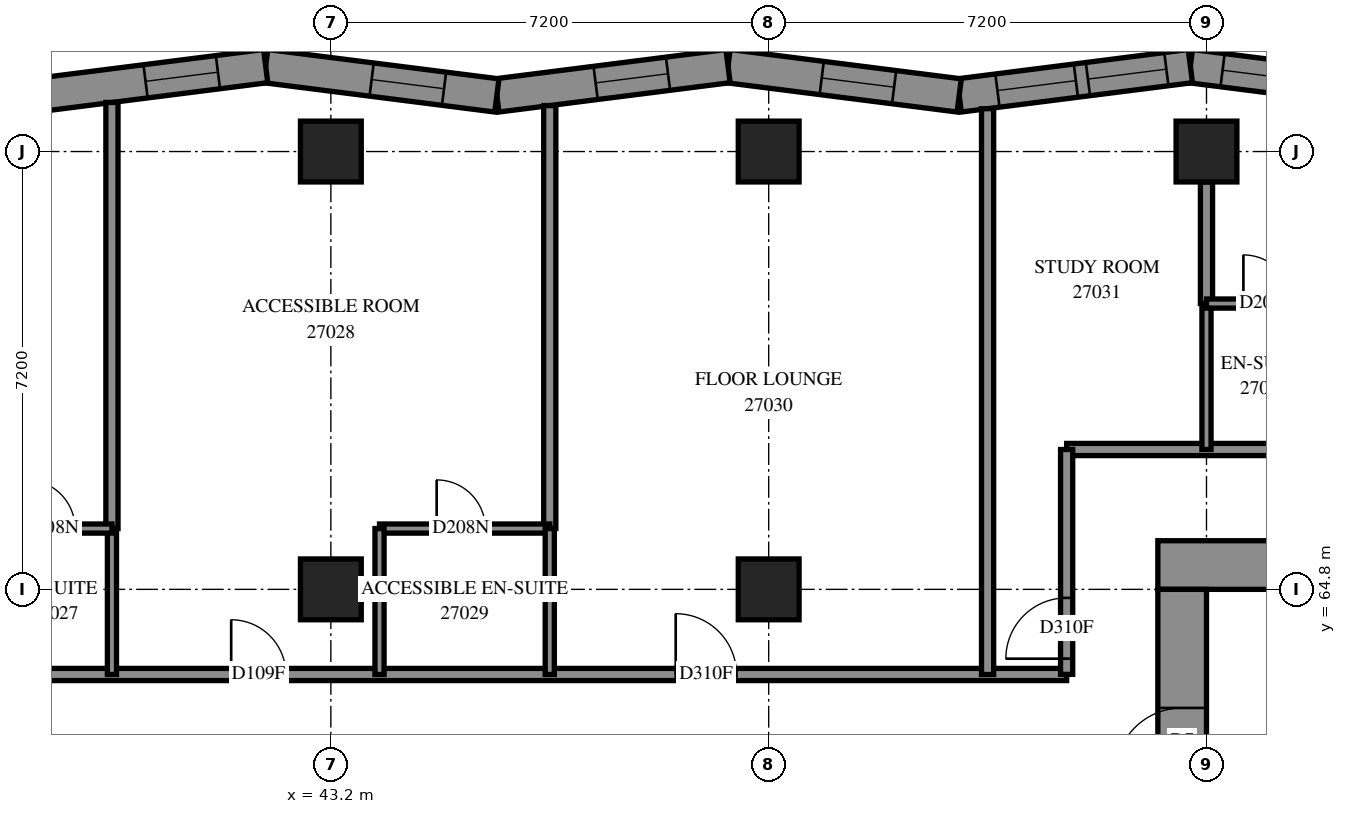
"""IFC4 building model, lengths in metres.
Left out: names, types, materials, properties, quantities, classifications, styles, units other than length and angle.
Written with IfcOpenShell. Run it as: python <this file> out.ifc"""

import sys

from ifc_helpers import new_model, si_unit, direction, frame, frame_2d, origin, origin_2d, place, context, subcontext, project, spatial, polyline, rectangle, outline, extrude, element, fill, save


model = new_model("IFC4")
c1 = context("Model", 3, precision=1e-05, world=origin(), true_north=direction((0.0, 1.0)))
c2 = subcontext(c1, "Body", "Model", "MODEL_VIEW")
j1 = project(units=[si_unit("LENGTHUNIT", "METRE"), si_unit("PLANEANGLEUNIT", "RADIAN")], contexts=[c1])
p1 = place(None, origin())
s1 = spatial("IfcSite", under=j1, at=p1, CompositionType="ELEMENT")
p2 = place(p1, origin())
s2 = spatial("IfcBuilding", under=s1, at=p2, CompositionType="ELEMENT")
p3 = place(p2, frame((0.0, 0.0, 101.6)))
s3 = spatial("IfcBuildingStorey", under=s2, at=p3, CompositionType="ELEMENT", Elevation=101.6)
for number, where, z_axis, x_axis in (
    (1, (43.2, 64.8, 0.0), (0.0, 0.0, 1.0), (1.0, 0.0, 0.0)),
    (2, (43.2, 72.0, 0.0), (0.0, 0.0, 1.0), (1.0, 0.0, 0.0)),
    (3, (50.4, 64.8, 0.0), (0.0, 0.0, 1.0), (1.0, 0.0, 0.0)),
    (4, (50.4, 72.0, 0.0), (0.0, 0.0, 1.0), (1.0, 0.0, 0.0)),
    (5, (57.6, 72.0, 0.0), (0.0, 0.0, 1.0), (1.0, 0.0, 0.0)),
):
    element("IfcColumn", number, at=place(p3, frame(where, z_axis=z_axis, x_axis=x_axis)), inside=s3, PredefinedType="COLUMN", context=c2, shape_type="SweptSolid", body=[
        extrude(rectangle(XDim=1.0, YDim=1.0, at=origin_2d()), origin(), (0.0, 0.0, 1.0), 3.1),
    ])
p4 = place(p3, frame((56.8, 65.2, -0.3), z_axis=(0.0, 0.0, 1.0), x_axis=(1.0, 0.0, 0.0)))
e6 = element("IfcWall", 6, at=p4, inside=s3, PredefinedType="SHEAR", context=c2, shape_type="SweptSolid", body=[
    extrude(rectangle(XDim=16.0, YDim=0.8, at=frame_2d((8.0, 0.0))), origin(), (0.0, 0.0, 1.0), 2.7),
])
p5 = place(p4, frame((10.8, 0.0, 0.3)))
e7 = element("IfcOpeningElement", 7, at=p5, cuts=e6, PredefinedType="OPENING", context=c2, shape_type="SweptSolid", body=[
    extrude(rectangle(XDim=0.8, YDim=2.1, at=frame_2d((0.4, 1.05))), frame((0.0, 0.41, 0.0), z_axis=(0.0, -1.0, 0.0), x_axis=(1.0, 0.0, 0.0)), (0.0, 0.0, 1.0), 0.82),
])
p6 = place(p3, frame((57.2, 50.4, -0.3), z_axis=(0.0, 0.0, 1.0), x_axis=(0.0, 1.0, 0.0)))
e8 = element("IfcWall", 8, at=p6, inside=s3, PredefinedType="SHEAR", context=c2, shape_type="SweptSolid", body=[
    extrude(rectangle(XDim=14.4, YDim=0.8, at=frame_2d((7.2, 0.0))), origin(), (0.0, 0.0, 1.0), 2.7),
])
p7 = place(p6, frame((4.55, 0.0, 0.3)))
e9 = element("IfcOpeningElement", 9, at=p7, cuts=e8, PredefinedType="OPENING", context=c2, shape_type="SweptSolid", body=[
    extrude(rectangle(XDim=1.1, YDim=2.1, at=frame_2d((0.55, 1.05))), frame((0.0, 0.41, 0.0), z_axis=(0.0, -1.0, 0.0), x_axis=(1.0, 0.0, 0.0)), (0.0, 0.0, 1.0), 0.82),
])
p8 = place(p6, frame((11.35, 0.0, 0.3)))
e10 = element("IfcOpeningElement", 10, at=p8, cuts=e8, PredefinedType="OPENING", context=c2, shape_type="SweptSolid", body=[
    extrude(rectangle(XDim=1.1, YDim=2.1, at=frame_2d((0.55, 1.05))), frame((0.0, 0.41, 0.0), z_axis=(0.0, -1.0, 0.0), x_axis=(1.0, 0.0, 0.0)), (0.0, 0.0, 1.0), 0.82),
])
p9 = place(p3, frame((61.137, 72.923, 0.0), z_axis=(0.0, 0.0, 1.0), x_axis=(-0.9920583495, 0.1257785003, 0.0)))
e11 = element("IfcWall", 11, at=p9, inside=s3, PredefinedType="SOLIDWALL", context=c2, shape_type="SweptSolid", body=[
    extrude(outline(polyline([(0.035, -0.275), (3.867, -0.275), (3.797, 0.275), (-0.035, 0.275), (0.035, -0.275)])), origin(), (0.0, 0.0, 1.0), 3.1),
])
p10 = place(p9, frame((0.499, 0.0, 0.5)))
e12 = element("IfcOpeningElement", 12, at=p10, cuts=e11, PredefinedType="OPENING", context=c2, shape_type="SweptSolid", body=[
    extrude(rectangle(XDim=1.3, YDim=2.45, at=frame_2d((0.65, 1.225))), frame((0.0, 0.285, 0.0), z_axis=(0.0, -1.0, 0.0), x_axis=(1.0, 0.0, 0.0)), (0.0, 0.0, 1.0), 0.57),
])
p11 = place(p9, frame((1.999, 0.0, 0.5)))
e13 = element("IfcOpeningElement", 13, at=p11, cuts=e11, PredefinedType="OPENING", context=c2, shape_type="SweptSolid", body=[
    extrude(rectangle(XDim=1.3, YDim=2.45, at=frame_2d((0.65, 1.225))), frame((0.0, 0.285, 0.0), z_axis=(0.0, -1.0, 0.0), x_axis=(1.0, 0.0, 0.0)), (0.0, 0.0, 1.0), 0.57),
])
p12 = place(p3, frame((57.335, 73.405, 0.0), z_axis=(0.0, 0.0, 1.0), x_axis=(-0.9920587623, -0.1257752442, 0.0)))
e14 = element("IfcWall", 14, at=p12, inside=s3, PredefinedType="SOLIDWALL", context=c2, shape_type="SweptSolid", body=[
    extrude(outline(polyline([(-0.035, -0.275), (3.797, -0.275), (3.867, 0.275), (0.035, 0.275), (-0.035, -0.275)])), origin(), (0.0, 0.0, 1.0), 3.1),
])
p13 = place(p12, frame((0.398, 0.0, 0.5)))
e15 = element("IfcOpeningElement", 15, at=p13, cuts=e14, PredefinedType="OPENING", context=c2, shape_type="SweptSolid", body=[
    extrude(rectangle(XDim=1.3, YDim=2.45, at=frame_2d((0.65, 1.225))), frame((0.0, 0.285, 0.0), z_axis=(0.0, -1.0, 0.0), x_axis=(1.0, 0.0, 0.0)), (0.0, 0.0, 1.0), 0.57),
])
p14 = place(p12, frame((1.898, 0.0, 0.5)))
e16 = element("IfcOpeningElement", 16, at=p14, cuts=e14, PredefinedType="OPENING", context=c2, shape_type="SweptSolid", body=[
    extrude(rectangle(XDim=1.3, YDim=2.45, at=frame_2d((0.65, 1.225))), frame((0.0, 0.285, 0.0), z_axis=(0.0, -1.0, 0.0), x_axis=(1.0, 0.0, 0.0)), (0.0, 0.0, 1.0), 0.57),
])
p15 = place(p3, frame((53.533, 72.923, 0.0), z_axis=(0.0, 0.0, 1.0), x_axis=(-0.9920583495, 0.1257785003, 0.0)))
e17 = element("IfcWall", 17, at=p15, inside=s3, PredefinedType="SOLIDWALL", context=c2, shape_type="SweptSolid", body=[
    extrude(outline(polyline([(0.035, -0.275), (3.867, -0.275), (3.797, 0.275), (-0.035, 0.275), (0.035, -0.275)])), origin(), (0.0, 0.0, 1.0), 3.1),
])
p16 = place(p15, frame((1.079, 0.0, 0.5)))
e18 = element("IfcOpeningElement", 18, at=p16, cuts=e17, PredefinedType="OPENING", context=c2, shape_type="SweptSolid", body=[
    extrude(rectangle(XDim=1.2, YDim=2.45, at=frame_2d((0.6, 1.225))), frame((0.0, 0.285, 0.0), z_axis=(0.0, -1.0, 0.0), x_axis=(1.0, 0.0, 0.0)), (0.0, 0.0, 1.0), 0.57),
])
p17 = place(p3, frame((49.732, 73.405, 0.0), z_axis=(0.0, 0.0, 1.0), x_axis=(-0.9920583495, -0.1257785003, 0.0)))
e19 = element("IfcWall", 19, at=p17, inside=s3, PredefinedType="SOLIDWALL", context=c2, shape_type="SweptSolid", body=[
    extrude(outline(polyline([(-0.035, -0.275), (3.797, -0.275), (3.867, 0.275), (0.035, 0.275), (-0.035, -0.275)])), origin(), (0.0, 0.0, 1.0), 3.1),
])
p18 = place(p17, frame((0.995, 0.0, 0.5)))
e20 = element("IfcOpeningElement", 20, at=p18, cuts=e19, PredefinedType="OPENING", context=c2, shape_type="SweptSolid", body=[
    extrude(rectangle(XDim=1.2, YDim=2.45, at=frame_2d((0.6, 1.225))), frame((0.0, 0.285, 0.0), z_axis=(0.0, -1.0, 0.0), x_axis=(1.0, 0.0, 0.0)), (0.0, 0.0, 1.0), 0.57),
])
p19 = place(p3, frame((45.93, 72.923, 0.0), z_axis=(0.0, 0.0, 1.0), x_axis=(-0.9920583495, 0.1257785003, 0.0)))
e21 = element("IfcWall", 21, at=p19, inside=s3, PredefinedType="SOLIDWALL", context=c2, shape_type="SweptSolid", body=[
    extrude(outline(polyline([(0.035, -0.275), (3.867, -0.275), (3.797, 0.275), (-0.035, 0.275), (0.035, -0.275)])), origin(), (0.0, 0.0, 1.0), 3.1),
])
p20 = place(p19, frame((0.876, 0.0, 0.5)))
e22 = element("IfcOpeningElement", 22, at=p20, cuts=e21, PredefinedType="OPENING", context=c2, shape_type="SweptSolid", body=[
    extrude(rectangle(XDim=1.2, YDim=2.45, at=frame_2d((0.6, 1.225))), frame((0.0, 0.285, 0.0), z_axis=(0.0, -1.0, 0.0), x_axis=(1.0, 0.0, 0.0)), (0.0, 0.0, 1.0), 0.57),
])
p21 = place(p3, frame((42.128, 73.405, 0.0), z_axis=(0.0, 0.0, 1.0), x_axis=(-0.9920583495, -0.1257785003, 0.0)))
e23 = element("IfcWall", 23, at=p21, inside=s3, PredefinedType="SOLIDWALL", context=c2, shape_type="SweptSolid", body=[
    extrude(outline(polyline([(-0.035, -0.275), (3.797, -0.275), (3.867, 0.275), (0.035, 0.275), (-0.035, -0.275)])), origin(), (0.0, 0.0, 1.0), 3.1),
])
p22 = place(p21, frame((0.792, 0.0, 0.5)))
e24 = element("IfcOpeningElement", 24, at=p22, cuts=e23, PredefinedType="OPENING", context=c2, shape_type="SweptSolid", body=[
    extrude(rectangle(XDim=1.2, YDim=2.45, at=frame_2d((0.6, 1.225))), frame((0.0, 0.285, 0.0), z_axis=(0.0, -1.0, 0.0), x_axis=(1.0, 0.0, 0.0)), (0.0, 0.0, 1.0), 0.57),
])
p23 = place(p3, frame((33.4, 63.4, 0.0), z_axis=(0.0, 0.0, 1.0), x_axis=(1.0, 0.0, 0.0)))
e25 = element("IfcWall", 25, at=p23, inside=s3, PredefinedType="PARTITIONING", context=c2, shape_type="SweptSolid", body=[
    extrude(rectangle(XDim=21.9, YDim=0.2, at=frame_2d((10.95, 0.0))), origin(), (0.0, 0.0, 1.0), 3.1),
])
p24 = place(p23, frame((3.152, 0.0, 0.0)))
e26 = element("IfcOpeningElement", 26, at=p24, cuts=e25, PredefinedType="OPENING", context=c2, shape_type="SweptSolid", body=[
    extrude(rectangle(XDim=0.9, YDim=2.1, at=frame_2d((0.45, 1.05))), frame((0.0, 0.11, 0.0), z_axis=(0.0, -1.0, 0.0), x_axis=(1.0, 0.0, 0.0)), (0.0, 0.0, 1.0), 0.22),
])
p25 = place(p23, frame((8.161, 0.0, 0.0)))
e27 = element("IfcOpeningElement", 27, at=p25, cuts=e25, PredefinedType="OPENING", context=c2, shape_type="SweptSolid", body=[
    extrude(rectangle(XDim=0.9, YDim=2.1, at=frame_2d((0.45, 1.05))), frame((0.0, 0.11, 0.0), z_axis=(0.0, -1.0, 0.0), x_axis=(1.0, 0.0, 0.0)), (0.0, 0.0, 1.0), 0.22),
])
p26 = place(p23, frame((15.471, 0.0, 0.0)))
e28 = element("IfcOpeningElement", 28, at=p26, cuts=e25, PredefinedType="OPENING", context=c2, shape_type="SweptSolid", body=[
    extrude(rectangle(XDim=1.0, YDim=2.1, at=frame_2d((0.5, 1.05))), frame((0.0, 0.11, 0.0), z_axis=(0.0, -1.0, 0.0), x_axis=(1.0, 0.0, 0.0)), (0.0, 0.0, 1.0), 0.22),
])
p27 = place(p3, frame((55.3, 67.1, 0.0), z_axis=(0.0, 0.0, 1.0), x_axis=(1.0, 0.0, 0.0)))
e29 = element("IfcWall", 29, at=p27, inside=s3, PredefinedType="PARTITIONING", context=c2, shape_type="SweptSolid", body=[
    extrude(rectangle(XDim=19.0, YDim=0.2, at=frame_2d((9.5, 0.0))), origin(), (0.0, 0.0, 1.0), 3.1),
])
p28 = place(p27, frame((6.199, 0.0, 0.0)))
e30 = element("IfcOpeningElement", 30, at=p28, cuts=e29, PredefinedType="OPENING", context=c2, shape_type="SweptSolid", body=[
    extrude(rectangle(XDim=0.9, YDim=2.1, at=frame_2d((0.45, 1.05))), frame((0.0, 0.11, 0.0), z_axis=(0.0, -1.0, 0.0), x_axis=(1.0, 0.0, 0.0)), (0.0, 0.0, 1.0), 0.22),
])
p29 = place(p27, frame((13.399, 0.0, 0.0)))
e31 = element("IfcOpeningElement", 31, at=p29, cuts=e29, PredefinedType="OPENING", context=c2, shape_type="SweptSolid", body=[
    extrude(rectangle(XDim=0.9, YDim=2.1, at=frame_2d((0.45, 1.05))), frame((0.0, 0.11, 0.0), z_axis=(0.0, -1.0, 0.0), x_axis=(1.0, 0.0, 0.0)), (0.0, 0.0, 1.0), 0.22),
])
p30 = place(p3, frame((54.0, 63.4, 0.0), z_axis=(0.0, 0.0, 1.0), x_axis=(0.0, 1.0, 0.0)))
e32 = element("IfcWall", 32, at=p30, inside=s3, PredefinedType="PARTITIONING", context=c2, shape_type="SweptSolid", body=[
    extrude(rectangle(XDim=9.305, YDim=0.2, at=frame_2d((4.652, 0.0))), origin(), (0.0, 0.0, 1.0), 3.1),
])
p31 = place(p3, frame((39.6, 65.8, 0.0), z_axis=(0.0, 0.0, 1.0), x_axis=(0.0, 1.0, 0.0)))
e33 = element("IfcWall", 33, at=p31, inside=s3, PredefinedType="PARTITIONING", context=c2, shape_type="SweptSolid", body=[
    extrude(rectangle(XDim=7.007, YDim=0.2, at=frame_2d((3.504, 0.0))), origin(), (0.0, 0.0, 1.0), 3.1),
])
p32 = place(p3, frame((46.8, 65.8, 0.0), z_axis=(0.0, 0.0, 1.0), x_axis=(0.0, 1.0, 0.0)))
e34 = element("IfcWall", 34, at=p32, inside=s3, PredefinedType="PARTITIONING", context=c2, shape_type="SweptSolid", body=[
    extrude(rectangle(XDim=6.956, YDim=0.2, at=frame_2d((3.478, 0.0))), origin(), (0.0, 0.0, 1.0), 3.1),
])
p33 = place(p3, frame((55.3, 63.402, 0.0), z_axis=(0.0, 0.0, 1.0), x_axis=(0.0, 1.0, 0.0)))
e35 = element("IfcWall", 35, at=p33, inside=s3, PredefinedType="PARTITIONING", context=c2, shape_type="SweptSolid", body=[
    extrude(rectangle(XDim=3.698, YDim=0.2, at=frame_2d((1.849, 0.0))), origin(), (0.0, 0.0, 1.0), 3.1),
])
p34 = place(p33, frame((0.258, 0.0, 0.0)))
e36 = element("IfcOpeningElement", 36, at=p34, cuts=e35, PredefinedType="OPENING", context=c2, shape_type="SweptSolid", body=[
    extrude(rectangle(XDim=1.0, YDim=2.1, at=frame_2d((0.5, 1.05))), frame((0.0, 0.11, 0.0), z_axis=(0.0, -1.0, 0.0), x_axis=(1.0, 0.0, 0.0)), (0.0, 0.0, 1.0), 0.22),
])
p35 = place(p3, frame((44.0, 65.8, 0.0), z_axis=(0.0, 0.0, 1.0), x_axis=(1.0, 0.0, 0.0)))
e37 = element("IfcWall", 37, at=p35, inside=s3, PredefinedType="PARTITIONING", context=c2, shape_type="SweptSolid", body=[
    extrude(rectangle(XDim=2.8, YDim=0.15, at=frame_2d((1.4, 0.0))), origin(), (0.0, 0.0, 1.0), 3.1),
])
p36 = place(p35, frame((0.94, 0.0, 0.0)))
e38 = element("IfcOpeningElement", 38, at=p36, cuts=e37, PredefinedType="OPENING", context=c2, shape_type="SweptSolid", body=[
    extrude(rectangle(XDim=0.8, YDim=2.1, at=frame_2d((0.4, 1.05))), frame((0.0, 0.085, 0.0), z_axis=(0.0, -1.0, 0.0), x_axis=(1.0, 0.0, 0.0)), (0.0, 0.0, 1.0), 0.17),
])
for number, where, z_axis, x_axis in (
    (39, (57.6, 67.1, 0.0), (0.0, 0.0, 1.0), (0.0, 1.0, 0.0)),
    (40, (39.6, 63.4, 0.0), (0.0, 0.0, 1.0), (0.0, 1.0, 0.0)),
    (41, (44.0, 63.4, 0.0), (0.0, 0.0, 1.0), (0.0, 1.0, 0.0)),
    (42, (46.8, 63.4, 0.0), (0.0, 0.0, 1.0), (0.0, 1.0, 0.0)),
):
    element("IfcWall", number, at=place(p3, frame(where, z_axis=z_axis, x_axis=x_axis)), inside=s3, PredefinedType="PARTITIONING", context=c2, shape_type="SweptSolid", body=[
        extrude(rectangle(XDim=2.4, YDim=0.15, at=frame_2d((1.2, 0.0))), origin(), (0.0, 0.0, 1.0), 3.1),
    ])
p37 = place(p3, frame((57.6, 69.5, 0.0), z_axis=(0.0, 0.0, 1.0), x_axis=(0.0, 1.0, 0.0)))
e43 = element("IfcWall", 43, at=p37, inside=s3, PredefinedType="PARTITIONING", context=c2, shape_type="SweptSolid", body=[
    extrude(rectangle(XDim=2.0, YDim=0.2, at=frame_2d((1.0, 0.0))), origin(), (0.0, 0.0, 1.0), 3.1),
])
p38 = place(p3, frame((37.7, 65.8, 0.0), z_axis=(0.0, 0.0, 1.0), x_axis=(1.0, 0.0, 0.0)))
e44 = element("IfcWall", 44, at=p38, inside=s3, PredefinedType="PARTITIONING", context=c2, shape_type="SweptSolid", body=[
    extrude(rectangle(XDim=1.9, YDim=0.15, at=frame_2d((0.95, 0.0))), origin(), (0.0, 0.0, 1.0), 3.1),
])
p39 = place(p38, frame((0.493, 0.0, 0.0)))
e45 = element("IfcOpeningElement", 45, at=p39, cuts=e44, PredefinedType="OPENING", context=c2, shape_type="SweptSolid", body=[
    extrude(rectangle(XDim=0.8, YDim=2.1, at=frame_2d((0.4, 1.05))), frame((0.0, 0.085, 0.0), z_axis=(0.0, -1.0, 0.0), x_axis=(1.0, 0.0, 0.0)), (0.0, 0.0, 1.0), 0.17),
])
p40 = place(p3, frame((57.6, 69.5, 0.0), z_axis=(0.0, 0.0, 1.0), x_axis=(1.0, 0.0, 0.0)))
e46 = element("IfcWall", 46, at=p40, inside=s3, PredefinedType="PARTITIONING", context=c2, shape_type="SweptSolid", body=[
    extrude(rectangle(XDim=1.9, YDim=0.15, at=frame_2d((0.95, 0.0))), origin(), (0.0, 0.0, 1.0), 3.1),
])
p41 = place(p40, frame((0.607, 0.0, 0.0)))
e47 = element("IfcOpeningElement", 47, at=p41, cuts=e46, PredefinedType="OPENING", context=c2, shape_type="SweptSolid", body=[
    extrude(rectangle(XDim=0.8, YDim=2.1, at=frame_2d((0.4, 1.05))), frame((0.0, 0.085, 0.0), z_axis=(0.0, -1.0, 0.0), x_axis=(1.0, 0.0, 0.0)), (0.0, 0.0, 1.0), 0.17),
])
p42 = place(p11, origin())
e48 = element("IfcWindow", 48, at=p42, inside=s3, PartitioningType="SINGLE_PANEL", PredefinedType="WINDOW", context=c2, shape_type="SweptSolid", body=[
    extrude(rectangle(XDim=1.3, YDim=2.45, at=frame_2d((0.65, 1.225))), frame((0.0, 0.155, 0.0), z_axis=(0.0, -1.0, 0.0), x_axis=(1.0, 0.0, 0.0)), (0.0, 0.0, 1.0), 0.06),
])
fill(e13, e48)
p43 = place(p13, origin())
e49 = element("IfcWindow", 49, at=p43, inside=s3, PartitioningType="SINGLE_PANEL", PredefinedType="WINDOW", context=c2, shape_type="SweptSolid", body=[
    extrude(rectangle(XDim=1.3, YDim=2.45, at=frame_2d((0.65, 1.225))), frame((0.0, 0.155, 0.0), z_axis=(0.0, -1.0, 0.0), x_axis=(1.0, 0.0, 0.0)), (0.0, 0.0, 1.0), 0.06),
])
fill(e15, e49)
p44 = place(p14, origin())
e50 = element("IfcWindow", 50, at=p44, inside=s3, PartitioningType="SINGLE_PANEL", PredefinedType="WINDOW", context=c2, shape_type="SweptSolid", body=[
    extrude(rectangle(XDim=1.3, YDim=2.45, at=frame_2d((0.65, 1.225))), frame((0.0, 0.155, 0.0), z_axis=(0.0, -1.0, 0.0), x_axis=(1.0, 0.0, 0.0)), (0.0, 0.0, 1.0), 0.06),
])
fill(e16, e50)
p45 = place(p16, origin())
e51 = element("IfcWindow", 51, at=p45, inside=s3, PartitioningType="SINGLE_PANEL", PredefinedType="WINDOW", context=c2, shape_type="SweptSolid", body=[
    extrude(rectangle(XDim=1.2, YDim=2.45, at=frame_2d((0.6, 1.225))), frame((0.0, 0.155, 0.0), z_axis=(0.0, -1.0, 0.0), x_axis=(1.0, 0.0, 0.0)), (0.0, 0.0, 1.0), 0.06),
])
fill(e18, e51)
p46 = place(p18, origin())
e52 = element("IfcWindow", 52, at=p46, inside=s3, PartitioningType="SINGLE_PANEL", PredefinedType="WINDOW", context=c2, shape_type="SweptSolid", body=[
    extrude(rectangle(XDim=1.2, YDim=2.45, at=frame_2d((0.6, 1.225))), frame((0.0, 0.155, 0.0), z_axis=(0.0, -1.0, 0.0), x_axis=(1.0, 0.0, 0.0)), (0.0, 0.0, 1.0), 0.06),
])
fill(e20, e52)
p47 = place(p20, origin())
e53 = element("IfcWindow", 53, at=p47, inside=s3, PartitioningType="SINGLE_PANEL", PredefinedType="WINDOW", context=c2, shape_type="SweptSolid", body=[
    extrude(rectangle(XDim=1.2, YDim=2.45, at=frame_2d((0.6, 1.225))), frame((0.0, 0.155, 0.0), z_axis=(0.0, -1.0, 0.0), x_axis=(1.0, 0.0, 0.0)), (0.0, 0.0, 1.0), 0.06),
])
fill(e22, e53)
p48 = place(p22, origin())
e54 = element("IfcWindow", 54, at=p48, inside=s3, PartitioningType="SINGLE_PANEL", PredefinedType="WINDOW", context=c2, shape_type="SweptSolid", body=[
    extrude(rectangle(XDim=1.2, YDim=2.45, at=frame_2d((0.6, 1.225))), frame((0.0, 0.155, 0.0), z_axis=(0.0, -1.0, 0.0), x_axis=(1.0, 0.0, 0.0)), (0.0, 0.0, 1.0), 0.06),
])
fill(e24, e54)
p49 = place(p8, origin())
e55 = element("IfcDoor", 55, at=p49, inside=s3, OperationType="SINGLE_SWING_LEFT", PredefinedType="DOOR", context=c2, shape_type="SweptSolid", body=[
    extrude(rectangle(XDim=1.1, YDim=2.1, at=frame_2d((0.55, 1.05))), frame((0.0, 0.025, 0.0), z_axis=(0.0, -1.0, 0.0), x_axis=(1.0, 0.0, 0.0)), (0.0, 0.0, 1.0), 0.05),
])
fill(e10, e55)
p50 = place(p39, origin())
e56 = element("IfcDoor", 56, at=p50, inside=s3, OperationType="SINGLE_SWING_RIGHT", PredefinedType="DOOR", context=c2, shape_type="SweptSolid", body=[
    extrude(rectangle(XDim=0.8, YDim=2.1, at=frame_2d((0.4, 1.05))), frame((0.0, 0.025, 0.0), z_axis=(0.0, -1.0, 0.0), x_axis=(1.0, 0.0, 0.0)), (0.0, 0.0, 1.0), 0.05),
])
fill(e45, e56)
p51 = place(p25, origin())
e57 = element("IfcDoor", 57, at=p51, inside=s3, OperationType="SINGLE_SWING_LEFT", PredefinedType="DOOR", context=c2, shape_type="SweptSolid", body=[
    extrude(rectangle(XDim=0.9, YDim=2.1, at=frame_2d((0.45, 1.05))), frame((0.0, 0.025, 0.0), z_axis=(0.0, -1.0, 0.0), x_axis=(1.0, 0.0, 0.0)), (0.0, 0.0, 1.0), 0.05),
])
fill(e27, e57)
p52 = place(p36, origin())
e58 = element("IfcDoor", 58, at=p52, inside=s3, OperationType="SINGLE_SWING_RIGHT", PredefinedType="DOOR", context=c2, shape_type="SweptSolid", body=[
    extrude(rectangle(XDim=0.8, YDim=2.1, at=frame_2d((0.4, 1.05))), frame((0.0, 0.025, 0.0), z_axis=(0.0, -1.0, 0.0), x_axis=(1.0, 0.0, 0.0)), (0.0, 0.0, 1.0), 0.05),
])
fill(e38, e58)
p53 = place(p26, origin())
e59 = element("IfcDoor", 59, at=p53, inside=s3, OperationType="SINGLE_SWING_LEFT", PredefinedType="DOOR", context=c2, shape_type="SweptSolid", body=[
    extrude(rectangle(XDim=1.0, YDim=2.1, at=frame_2d((0.5, 1.05))), frame((0.0, 0.025, 0.0), z_axis=(0.0, -1.0, 0.0), x_axis=(1.0, 0.0, 0.0)), (0.0, 0.0, 1.0), 0.05),
])
fill(e28, e59)
p54 = place(p34, origin())
e60 = element("IfcDoor", 60, at=p54, inside=s3, OperationType="SINGLE_SWING_LEFT", PredefinedType="DOOR", context=c2, shape_type="SweptSolid", body=[
    extrude(rectangle(XDim=1.0, YDim=2.1, at=frame_2d((0.5, 1.05))), frame((0.0, 0.025, 0.0), z_axis=(0.0, -1.0, 0.0), x_axis=(1.0, 0.0, 0.0)), (0.0, 0.0, 1.0), 0.05),
])
fill(e36, e60)
p55 = place(p41, origin())
e61 = element("IfcDoor", 61, at=p55, inside=s3, OperationType="SINGLE_SWING_RIGHT", PredefinedType="DOOR", context=c2, shape_type="SweptSolid", body=[
    extrude(rectangle(XDim=0.8, YDim=2.1, at=frame_2d((0.4, 1.05))), frame((0.0, 0.025, 0.0), z_axis=(0.0, -1.0, 0.0), x_axis=(1.0, 0.0, 0.0)), (0.0, 0.0, 1.0), 0.05),
])
fill(e47, e61)
save(model, sys.argv[1])
